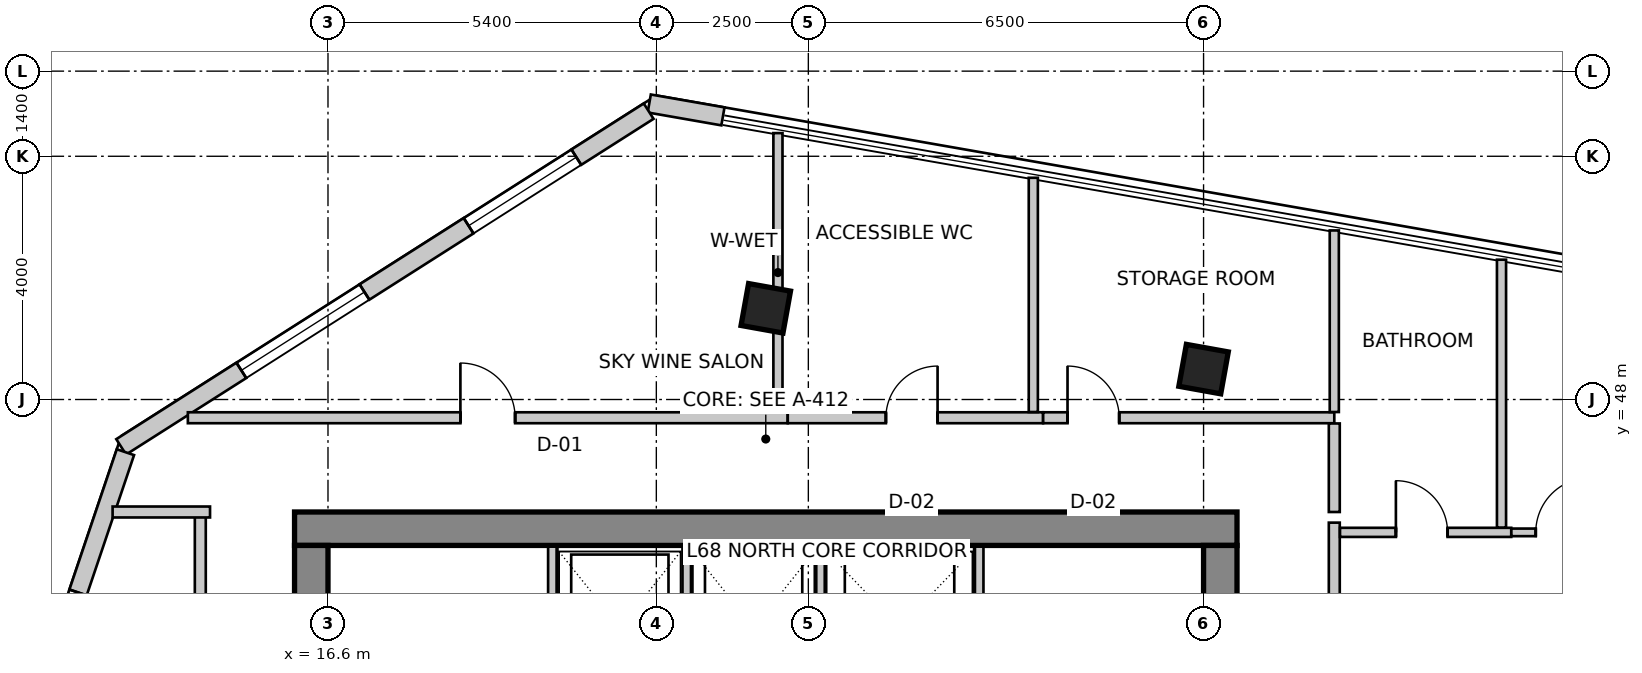
"""IFC4 building model, lengths in metres.
Left out: names, types, materials, properties, quantities, classifications, styles, units other than length and angle.
Written with IfcOpenShell. Run it as: python <this file> out.ifc"""

import sys

from ifc_helpers import new_model, si_unit, direction, frame, frame_2d, origin, origin_2d, place, context, subcontext, project, spatial, rectangle, extrude, source, transform, mapped, element, fill, save


model = new_model("IFC4")
c1 = context("Model", 3, precision=1e-05, world=origin(), true_north=direction((0.0, 1.0)))
c2 = subcontext(c1, "Body", "Model", "MODEL_VIEW")
j1 = project(units=[si_unit("LENGTHUNIT", "METRE"), si_unit("PLANEANGLEUNIT", "RADIAN")], contexts=[c1])
p1 = place(None, origin())
s1 = spatial("IfcSite", under=j1, at=p1, CompositionType="ELEMENT")
p2 = place(p1, origin())
s2 = spatial("IfcBuilding", under=s1, at=p2, CompositionType="ELEMENT")
p3 = place(p2, frame((0.0, 0.0, 267.3)))
s3 = spatial("IfcBuildingStorey", under=s2, at=p3, CompositionType="ELEMENT", Elevation=267.3)
p4 = place(p3, frame((16.05, 45.875, 0.0), z_axis=(0.0, 0.0, 1.0), x_axis=(1.0, 0.0, 0.0)))
e1 = element("IfcWall", 1, at=p4, inside=s3, PredefinedType="SHEAR", context=c2, shape_type="SweptSolid", body=[
    extrude(rectangle(XDim=15.5, YDim=0.55, at=frame_2d((7.75, 0.0))), origin(), (0.0, 0.0, 1.0), 3.6),
])
p5 = place(p3, frame((16.325, 34.2, 0.0), z_axis=(0.0, 0.0, 1.0), x_axis=(0.0, 1.0, 0.0)))
e2 = element("IfcWall", 2, at=p5, inside=s3, PredefinedType="SHEAR", context=c2, shape_type="SweptSolid", body=[
    extrude(rectangle(XDim=11.4, YDim=0.55, at=frame_2d((5.7, 0.0))), origin(), (0.0, 0.0, 1.0), 3.6),
])
m1 = source(origin(), c2, "Body", "SweptSolid", [
    extrude(rectangle(XDim=1.1, YDim=2.15, at=frame_2d((0.55, 1.075))), frame((0.0, 0.285, 0.0), z_axis=(0.0, -1.0, 0.0), x_axis=(1.0, 0.0, 0.0)), (0.0, 0.0, 1.0), 0.57),
])
p6 = place(p5, frame((7.15, 0.0, 0.0)))
e3 = element("IfcOpeningElement", 3, at=p6, cuts=e2, PredefinedType="OPENING", context=c2, shape_type="MappedRepresentation", body=[
    mapped(m1, transform((0.0, 0.0, 0.0), scale=1.0)),
])
p7 = place(p3, frame((31.275, 34.2, 0.0), z_axis=(0.0, 0.0, 1.0), x_axis=(0.0, 1.0, 0.0)))
e4 = element("IfcWall", 4, at=p7, inside=s3, PredefinedType="SHEAR", context=c2, shape_type="SweptSolid", body=[
    extrude(rectangle(XDim=11.4, YDim=0.55, at=frame_2d((5.7, 0.0))), origin(), (0.0, 0.0, 1.0), 3.6),
])
p8 = place(p7, frame((7.35, 0.0, 0.0)))
e5 = element("IfcOpeningElement", 5, at=p8, cuts=e4, PredefinedType="OPENING", context=c2, shape_type="MappedRepresentation", body=[
    mapped(m1, transform((0.0, 0.0, 0.0), scale=1.0)),
])
m2 = source(origin(), c2, "Body", "SweptSolid", [
    extrude(rectangle(XDim=0.7, YDim=0.7, at=origin_2d()), origin(), (0.0, 0.0, 1.0), 3.6),
])
for number, where, z_axis, x_axis in (
    (6, (23.8, 49.5, 0.0), (0.0, 0.0, 1.0), (0.984, -0.177, 0.0)),
    (7, (31.0, 48.5, 0.0), (0.0, 0.0, 1.0), (0.984, -0.177, 0.0)),
):
    element("IfcColumn", number, at=place(p3, frame(where, z_axis=z_axis, x_axis=x_axis)), inside=s3, PredefinedType="COLUMN", context=c2, shape_type="MappedRepresentation", body=[
        mapped(m2, transform((0.0, 0.0, 0.0), scale=1.0)),
    ])
p9 = place(p3, frame((23.095, 52.656, 0.0), z_axis=(0.0, 0.0, 1.0), x_axis=(-0.985008549623, 0.172505527937, 0.0)))
e8 = element("IfcWall", 8, at=p9, inside=s3, PredefinedType="SOLIDWALL", context=c2, shape_type="SweptSolid", body=[
    extrude(rectangle(XDim=1.23, YDim=0.3, at=frame_2d((0.615, 0.0))), origin(), (0.0, 0.0, 1.0), 3.35),
])
p10 = place(p3, frame((21.874, 52.742, 0.0), z_axis=(0.0, 0.0, 1.0), x_axis=(-0.84365659959, -0.536883173482, 0.0)))
e9 = element("IfcWall", 9, at=p10, inside=s3, PredefinedType="SOLIDWALL", context=c2, shape_type="SweptSolid", body=[
    extrude(rectangle(XDim=10.283, YDim=0.3, at=frame_2d((5.142, 0.0))), origin(), (0.0, 0.0, 1.0), 3.35),
])
m3 = source(origin(), c2, "Body", "SweptSolid", [
    extrude(rectangle(XDim=2.1, YDim=2.0, at=frame_2d((1.05, 1.0))), frame((0.0, 0.16, 0.0), z_axis=(0.0, -1.0, 0.0), x_axis=(1.0, 0.0, 0.0)), (0.0, 0.0, 1.0), 0.32),
])
p11 = place(p10, frame((1.41, 0.0, 0.85)))
e10 = element("IfcOpeningElement", 10, at=p11, cuts=e9, PredefinedType="OPENING", context=c2, shape_type="MappedRepresentation", body=[
    mapped(m3, transform((0.0, 0.0, 0.0), scale=1.0)),
])
m4 = source(origin(), c2, "Body", "SweptSolid", [
    extrude(rectangle(XDim=2.4, YDim=2.2, at=frame_2d((1.2, 1.1))), frame((0.0, 0.16, 0.0), z_axis=(0.0, -1.0, 0.0), x_axis=(1.0, 0.0, 0.0)), (0.0, 0.0, 1.0), 0.32),
])
p12 = place(p10, frame((5.54, 0.0, 0.85)))
e11 = element("IfcOpeningElement", 11, at=p12, cuts=e9, PredefinedType="OPENING", context=c2, shape_type="MappedRepresentation", body=[
    mapped(m4, transform((0.0, 0.0, 0.0), scale=1.0)),
])
p13 = place(p3, frame((13.269, 47.134, 0.0), z_axis=(0.0, 0.0, 1.0), x_axis=(-0.3199211297, -0.947444178182, 0.0)))
e12 = element("IfcWall", 12, at=p13, inside=s3, PredefinedType="SOLIDWALL", context=c2, shape_type="SweptSolid", body=[
    extrude(rectangle(XDim=16.132, YDim=0.3, at=frame_2d((8.066, 0.0))), origin(), (0.0, 0.0, 1.0), 3.35),
])
p14 = place(p13, frame((2.435, 0.0, 0.85)))
e13 = element("IfcOpeningElement", 13, at=p14, cuts=e12, PredefinedType="OPENING", context=c2, shape_type="MappedRepresentation", body=[
    mapped(m4, transform((0.0, 0.0, 0.0), scale=1.0)),
])
p15 = place(p13, frame((7.417, 0.0, 0.85)))
e14 = element("IfcOpeningElement", 14, at=p15, cuts=e12, PredefinedType="OPENING", context=c2, shape_type="MappedRepresentation", body=[
    mapped(m3, transform((0.0, 0.0, 0.0), scale=1.0)),
])
p16 = place(p13, frame((12.099, 0.0, 0.85)))
e15 = element("IfcOpeningElement", 15, at=p16, cuts=e12, PredefinedType="OPENING", context=c2, shape_type="MappedRepresentation", body=[
    mapped(m4, transform((0.0, 0.0, 0.0), scale=1.0)),
])
for number, where, z_axis, x_axis in (
    (16, (20.29, 43.28, 0.0), (0.0, 0.0, 1.0), (0.0, 1.0, 0.0)),
    (17, (27.31, 43.28, 0.0), (0.0, 0.0, 1.0), (0.0, 1.0, 0.0)),
):
    element("IfcWall", number, at=place(p3, frame(where, z_axis=z_axis, x_axis=x_axis)), inside=s3, PredefinedType="SOLIDWALL", context=c2, shape_type="SweptSolid", body=[
        extrude(rectangle(XDim=2.3, YDim=0.14, at=frame_2d((1.15, 0.0))), origin(), (0.0, 0.0, 1.0), 3.35),
    ])
for number, where, z_axis, x_axis in (
    (18, (22.5, 43.02, 0.0), (0.0, 0.0, 1.0), (0.0, 1.0, 0.0)),
    (19, (24.7, 43.02, 0.0), (0.0, 0.0, 1.0), (0.0, 1.0, 0.0)),
):
    element("IfcWall", number, at=place(p3, frame(where, z_axis=z_axis, x_axis=x_axis)), inside=s3, PredefinedType="SOLIDWALL", context=c2, shape_type="SweptSolid", body=[
        extrude(rectangle(XDim=2.56, YDim=0.14, at=frame_2d((1.28, 0.0))), origin(), (0.0, 0.0, 1.0), 3.35),
    ])
p17 = place(p3, frame((14.5, 33.744, 0.0), z_axis=(0.0, 0.0, 1.0), x_axis=(0.0, 1.0, 0.0)))
e20 = element("IfcWall", 20, at=p17, inside=s3, PredefinedType="PARTITIONING", context=c2, shape_type="SweptSolid", body=[
    extrude(rectangle(XDim=12.406, YDim=0.18, at=frame_2d((6.203, 0.0))), origin(), (0.0, 0.0, 1.0), 3.35),
])
m5 = source(origin(), c2, "Body", "SweptSolid", [
    extrude(rectangle(XDim=0.9, YDim=2.15, at=frame_2d((0.45, 1.075))), frame((0.0, 0.1, 0.0), z_axis=(0.0, -1.0, 0.0), x_axis=(1.0, 0.0, 0.0)), (0.0, 0.0, 1.0), 0.2),
])
p18 = place(p17, frame((4.37, 0.0, 0.0)))
e21 = element("IfcOpeningElement", 21, at=p18, cuts=e20, PredefinedType="OPENING", context=c2, shape_type="MappedRepresentation", body=[
    mapped(m5, transform((0.0, 0.0, 0.0), scale=1.0)),
])
p19 = place(p3, frame((14.66, 46.15, 0.0), z_axis=(0.0, 0.0, 1.0), x_axis=(-1.0, 0.0, 0.0)))
e22 = element("IfcWall", 22, at=p19, inside=s3, PredefinedType="PARTITIONING", context=c2, shape_type="SweptSolid", body=[
    extrude(rectangle(XDim=1.602, YDim=0.18, at=frame_2d((0.801, 0.0))), origin(), (0.0, 0.0, 1.0), 3.35),
])
p20 = place(p3, frame((14.295, 47.7, 0.0), z_axis=(0.0, 0.0, 1.0), x_axis=(1.0, 0.0, 0.0)))
e23 = element("IfcWall", 23, at=p20, inside=s3, PredefinedType="PARTITIONING", context=c2, shape_type="SweptSolid", body=[
    extrude(rectangle(XDim=9.865, YDim=0.18, at=frame_2d((4.932, 0.0))), origin(), (0.0, 0.0, 1.0), 3.034),
])
p21 = place(p20, frame((4.482, 0.0, 0.0)))
e24 = element("IfcOpeningElement", 24, at=p21, cuts=e23, PredefinedType="OPENING", context=c2, shape_type="MappedRepresentation", body=[
    mapped(m5, transform((0.0, 0.0, 0.0), scale=1.0)),
])
p22 = place(p3, frame((24.162, 47.7, 0.0), z_axis=(0.0, 0.0, 1.0), x_axis=(1.0, 0.0, 0.0)))
e25 = element("IfcWall", 25, at=p22, inside=s3, PredefinedType="PARTITIONING", context=c2, shape_type="SweptSolid", body=[
    extrude(rectangle(XDim=4.198, YDim=0.18, at=frame_2d((2.099, 0.0))), origin(), (0.0, 0.0, 1.0), 3.35),
])
m6 = source(origin(), c2, "Body", "SweptSolid", [
    extrude(rectangle(XDim=0.85, YDim=2.15, at=frame_2d((0.425, 1.075))), frame((0.0, 0.1, 0.0), z_axis=(0.0, -1.0, 0.0), x_axis=(1.0, 0.0, 0.0)), (0.0, 0.0, 1.0), 0.2),
])
p23 = place(p22, frame((1.613, 0.0, 0.0)))
e26 = element("IfcOpeningElement", 26, at=p23, cuts=e25, PredefinedType="OPENING", context=c2, shape_type="MappedRepresentation", body=[
    mapped(m6, transform((0.0, 0.0, 0.0), scale=1.0)),
])
p24 = place(p3, frame((28.362, 47.7, 0.0), z_axis=(0.0, 0.0, 1.0), x_axis=(1.0, 0.0, 0.0)))
e27 = element("IfcWall", 27, at=p24, inside=s3, PredefinedType="PARTITIONING", context=c2, shape_type="SweptSolid", body=[
    extrude(rectangle(XDim=4.788, YDim=0.18, at=frame_2d((2.394, 0.0))), origin(), (0.0, 0.0, 1.0), 2.922),
])
p25 = place(p24, frame((0.401, 0.0, 0.0)))
e28 = element("IfcOpeningElement", 28, at=p25, cuts=e27, PredefinedType="OPENING", context=c2, shape_type="MappedRepresentation", body=[
    mapped(m6, transform((0.0, 0.0, 0.0), scale=1.0)),
])
p26 = place(p3, frame((33.15, 47.606, 0.0), z_axis=(0.0, 0.0, 1.0), x_axis=(0.0, -1.0, 0.0)))
e29 = element("IfcWall", 29, at=p26, inside=s3, PredefinedType="PARTITIONING", context=c2, shape_type="SweptSolid", body=[
    extrude(rectangle(XDim=1.456, YDim=0.18, at=frame_2d((0.728, 0.0))), origin(), (0.0, 0.0, 1.0), 3.35),
])
p27 = place(p3, frame((33.15, 45.975, 0.0), z_axis=(0.0, 0.0, 1.0), x_axis=(0.0, -1.0, 0.0)))
e30 = element("IfcWall", 30, at=p27, inside=s3, PredefinedType="PARTITIONING", context=c2, shape_type="SweptSolid", body=[
    extrude(rectangle(XDim=5.285, YDim=0.18, at=frame_2d((2.643, 0.0))), origin(), (0.0, 0.0, 1.0), 2.922),
])
p28 = place(p3, frame((24.0, 52.381, 0.0), z_axis=(0.0, 0.0, 1.0), x_axis=(0.0, -1.0, 0.0)))
e31 = element("IfcWall", 31, at=p28, inside=s3, PredefinedType="PARTITIONING", context=c2, shape_type="SweptSolid", body=[
    extrude(rectangle(XDim=4.587, YDim=0.15, at=frame_2d((2.293, 0.0))), origin(), (0.0, 0.0, 1.0), 2.642),
])
p29 = place(p3, frame((28.2, 51.646, 0.0), z_axis=(0.0, 0.0, 1.0), x_axis=(0.0, -1.0, 0.0)))
e32 = element("IfcWall", 32, at=p29, inside=s3, PredefinedType="PARTITIONING", context=c2, shape_type="SweptSolid", body=[
    extrude(rectangle(XDim=3.852, YDim=0.15, at=frame_2d((1.926, 0.0))), origin(), (0.0, 0.0, 1.0), 2.642),
])
p30 = place(p3, frame((33.15, 50.78, 0.0), z_axis=(0.0, 0.0, 1.0), x_axis=(0.0, -1.0, 0.0)))
e33 = element("IfcWall", 33, at=p30, inside=s3, PredefinedType="PARTITIONING", context=c2, shape_type="SweptSolid", body=[
    extrude(rectangle(XDim=2.986, YDim=0.15, at=frame_2d((1.493, 0.0))), origin(), (0.0, 0.0, 1.0), 2.642),
])
p31 = place(p3, frame((33.244, 45.815, 0.0), z_axis=(0.0, 0.0, 1.0), x_axis=(1.0, 0.0, 0.0)))
e34 = element("IfcWall", 34, at=p31, inside=s3, PredefinedType="PARTITIONING", context=c2, shape_type="SweptSolid", body=[
    extrude(rectangle(XDim=2.816, YDim=0.15, at=frame_2d((1.408, 0.0))), origin(), (0.0, 0.0, 1.0), 2.922),
])
m7 = source(origin(), c2, "Body", "SweptSolid", [
    extrude(rectangle(XDim=0.85, YDim=2.15, at=frame_2d((0.425, 1.075))), frame((0.0, 0.085, 0.0), z_axis=(0.0, -1.0, 0.0), x_axis=(1.0, 0.0, 0.0)), (0.0, 0.0, 1.0), 0.17),
])
p32 = place(p31, frame((0.919, 0.0, 0.0)))
e35 = element("IfcOpeningElement", 35, at=p32, cuts=e34, PredefinedType="OPENING", context=c2, shape_type="MappedRepresentation", body=[
    mapped(m7, transform((0.0, 0.0, 0.0), scale=1.0)),
])
p33 = place(p3, frame((36.062, 45.815, 0.0), z_axis=(0.0, 0.0, 1.0), x_axis=(1.0, 0.0, 0.0)))
e36 = element("IfcWall", 36, at=p33, inside=s3, PredefinedType="PARTITIONING", context=c2, shape_type="SweptSolid", body=[
    extrude(rectangle(XDim=4.615, YDim=0.125, at=frame_2d((2.308, 0.0))), origin(), (0.0, 0.0, 1.0), 2.979),
])
m8 = source(origin(), c2, "Body", "SweptSolid", [
    extrude(rectangle(XDim=0.9, YDim=2.15, at=frame_2d((0.45, 1.075))), frame((0.0, 0.073, 0.0), z_axis=(0.0, -1.0, 0.0), x_axis=(1.0, 0.0, 0.0)), (0.0, 0.0, 1.0), 0.145),
])
p34 = place(p33, frame((0.401, 0.0, 0.0)))
e37 = element("IfcOpeningElement", 37, at=p34, cuts=e36, PredefinedType="OPENING", context=c2, shape_type="MappedRepresentation", body=[
    mapped(m8, transform((0.0, 0.0, 0.0), scale=1.0)),
])
p35 = place(p3, frame((35.9, 50.299, 0.0), z_axis=(0.0, 0.0, 1.0), x_axis=(0.0, -1.0, 0.0)))
e38 = element("IfcWall", 38, at=p35, inside=s3, PredefinedType="PARTITIONING", context=c2, shape_type="SweptSolid", body=[
    extrude(rectangle(XDim=4.405, YDim=0.15, at=frame_2d((2.203, 0.0))), origin(), (0.0, 0.0, 1.0), 2.642),
])
m9 = source(origin(), c2, "Body", "SweptSolid", [
    extrude(rectangle(XDim=2.1, YDim=2.0, at=frame_2d((1.05, 1.0))), frame((0.0, -0.015, 0.0), z_axis=(0.0, -1.0, 0.0), x_axis=(1.0, 0.0, 0.0)), (0.0, 0.0, 1.0), 0.06),
])
p36 = place(p11, origin())
e39 = element("IfcWindow", 39, at=p36, inside=s3, PartitioningType="SINGLE_PANEL", PredefinedType="WINDOW", context=c2, shape_type="MappedRepresentation", body=[
    mapped(m9, transform((0.0, 0.0, 0.0), scale=1.0)),
])
fill(e10, e39)
m10 = source(origin(), c2, "Body", "SweptSolid", [
    extrude(rectangle(XDim=2.4, YDim=2.2, at=frame_2d((1.2, 1.1))), frame((0.0, -0.015, 0.0), z_axis=(0.0, -1.0, 0.0), x_axis=(1.0, 0.0, 0.0)), (0.0, 0.0, 1.0), 0.06),
])
p37 = place(p12, origin())
e40 = element("IfcWindow", 40, at=p37, inside=s3, PartitioningType="SINGLE_PANEL", PredefinedType="WINDOW", context=c2, shape_type="MappedRepresentation", body=[
    mapped(m10, transform((0.0, 0.0, 0.0), scale=1.0)),
])
fill(e11, e40)
p38 = place(p14, origin())
e41 = element("IfcWindow", 41, at=p38, inside=s3, PartitioningType="SINGLE_PANEL", PredefinedType="WINDOW", context=c2, shape_type="MappedRepresentation", body=[
    mapped(m10, transform((0.0, 0.0, 0.0), scale=1.0)),
])
fill(e13, e41)
m11 = source(origin(), c2, "Body", "SweptSolid", [
    extrude(rectangle(XDim=0.9, YDim=2.15, at=frame_2d((0.45, 1.075))), frame((0.0, 0.025, 0.0), z_axis=(0.0, -1.0, 0.0), x_axis=(1.0, 0.0, 0.0)), (0.0, 0.0, 1.0), 0.05),
])
p39 = place(p21, origin())
e42 = element("IfcDoor", 42, at=p39, inside=s3, OperationType="SINGLE_SWING_LEFT", PredefinedType="DOOR", context=c2, shape_type="MappedRepresentation", body=[
    mapped(m11, transform((0.0, 0.0, 0.0), scale=1.0)),
])
fill(e24, e42)
m12 = source(origin(), c2, "Body", "SweptSolid", [
    extrude(rectangle(XDim=0.85, YDim=2.15, at=frame_2d((0.425, 1.075))), frame((0.0, 0.025, 0.0), z_axis=(0.0, -1.0, 0.0), x_axis=(1.0, 0.0, 0.0)), (0.0, 0.0, 1.0), 0.05),
])
p40 = place(p23, origin())
e43 = element("IfcDoor", 43, at=p40, inside=s3, OperationType="SINGLE_SWING_RIGHT", PredefinedType="DOOR", context=c2, shape_type="MappedRepresentation", body=[
    mapped(m12, transform((0.0, 0.0, 0.0), scale=1.0)),
])
fill(e26, e43)
p41 = place(p25, origin())
e44 = element("IfcDoor", 44, at=p41, inside=s3, OperationType="SINGLE_SWING_LEFT", PredefinedType="DOOR", context=c2, shape_type="MappedRepresentation", body=[
    mapped(m12, transform((0.0, 0.0, 0.0), scale=1.0)),
])
fill(e28, e44)
p42 = place(p32, origin())
e45 = element("IfcDoor", 45, at=p42, inside=s3, OperationType="SINGLE_SWING_LEFT", PredefinedType="DOOR", context=c2, shape_type="MappedRepresentation", body=[
    mapped(m12, transform((0.0, 0.0, 0.0), scale=1.0)),
])
fill(e35, e45)
p43 = place(p34, origin())
e46 = element("IfcDoor", 46, at=p43, inside=s3, OperationType="SINGLE_SWING_RIGHT", PredefinedType="DOOR", context=c2, shape_type="MappedRepresentation", body=[
    mapped(m11, transform((0.0, 0.0, 0.0), scale=1.0)),
])
fill(e37, e46)
save(model, sys.argv[1])
